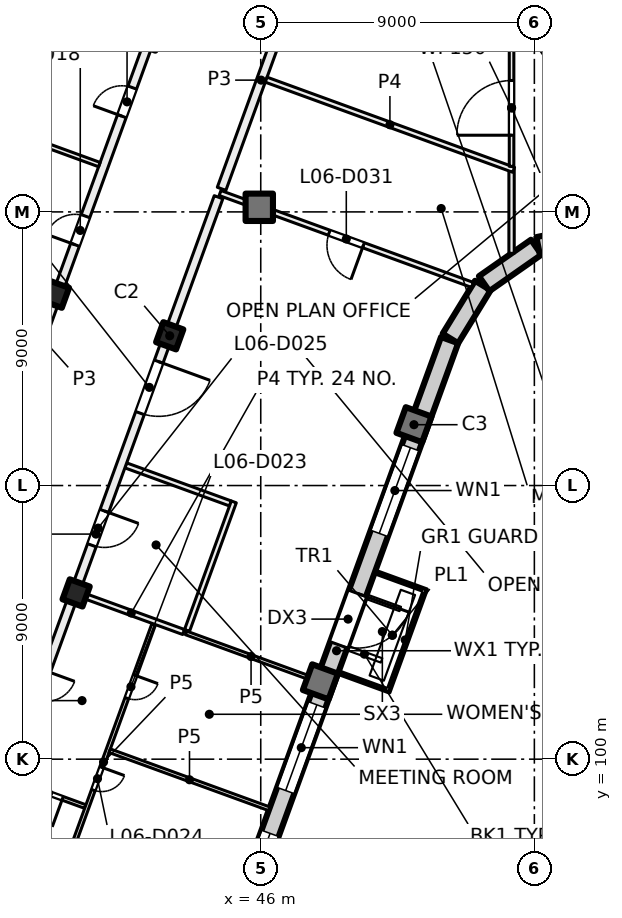
"""IFC4 building model, lengths in metres.
Left out: names, types, materials, properties, quantities, classifications, styles, units other than length and angle.
Written with IfcOpenShell. Run it as: python <this file> out.ifc"""

import sys

from ifc_helpers import new_model, si_unit, direction, frame, frame_2d, origin, origin_2d, place, context, subcontext, project, spatial, rectangle, hollow_rectangle, extrude, element, fill, save


model = new_model("IFC4")
c1 = context("Model", 3, precision=1e-05, world=origin(), true_north=direction((0.0, 1.0)))
c2 = subcontext(c1, "Body", "Model", "MODEL_VIEW")
j1 = project(units=[si_unit("LENGTHUNIT", "METRE"), si_unit("PLANEANGLEUNIT", "RADIAN")], contexts=[c1])
p1 = place(None, origin())
s1 = spatial("IfcSite", under=j1, at=p1, CompositionType="ELEMENT")
p2 = place(p1, origin())
s2 = spatial("IfcBuilding", under=s1, at=p2, CompositionType="ELEMENT")
p3 = place(p2, frame((0.0, 0.0, 31.5)))
s3 = spatial("IfcBuildingStorey", under=s2, at=p3, CompositionType="ELEMENT", Elevation=31.5)
p4 = place(p3, frame((56.036, 123.43, 0.0), z_axis=(0.0, 0.0, 1.0), x_axis=(0.573576436351, -0.819152044289, 0.0)))
e1 = element("IfcColumn", 1, at=p4, inside=s3, PredefinedType="COLUMN", context=c2, shape_type="SweptSolid", body=[
    extrude(hollow_rectangle(XDim=1.4, YDim=1.4, WallThickness=0.04, at=origin_2d()), origin(), (0.0, 0.0, 1.0), 4.0),
])
p5 = place(p3, frame((45.952, 118.152, 0.0), z_axis=(0.0, 0.0, 1.0), x_axis=(1.0, 0.0, 0.0)))
e2 = element("IfcColumn", 2, at=p5, inside=s3, PredefinedType="COLUMN", context=c2, shape_type="SweptSolid", body=[
    extrude(rectangle(XDim=0.9, YDim=0.9, at=origin_2d()), origin(), (0.0, 0.0, 1.0), 4.0),
])
for number, where, z_axis, x_axis in (
    (3, (43.006, 113.925, 0.0), (0.0, 0.0, 1.0), (-0.342, -0.94, 0.0)),
    (4, (39.927, 105.468, 0.0), (0.0, 0.0, 1.0), (-0.342, -0.94, 0.0)),
    (5, (39.247, 115.293, 0.0), (0.0, 0.0, 1.0), (-0.342, -0.94, 0.0)),
):
    element("IfcColumn", number, at=place(p3, frame(where, z_axis=z_axis, x_axis=x_axis)), inside=s3, PredefinedType="COLUMN", context=c2, shape_type="SweptSolid", body=[
        extrude(rectangle(XDim=0.7, YDim=0.7, at=origin_2d()), origin(), (0.0, 0.0, 1.0), 4.0),
    ])
for number, where, z_axis, x_axis in (
    (6, (51.04, 111.001, 0.0), (0.0, 0.0, 1.0), (-0.342, -0.94, 0.0)),
    (7, (47.962, 102.544, 0.0), (0.0, 0.0, 1.0), (-0.342, -0.94, 0.0)),
):
    element("IfcColumn", number, at=place(p3, frame(where, z_axis=z_axis, x_axis=x_axis)), inside=s3, PredefinedType="COLUMN", context=c2, shape_type="SweptSolid", body=[
        extrude(rectangle(XDim=0.9, YDim=0.9, at=origin_2d()), origin(), (0.0, 0.0, 1.0), 4.0),
    ])
p6 = place(p3, frame((52.212, 113.783, 0.0), z_axis=(0.0, 0.0, 1.0), x_axis=(-0.34202521188, -0.939690775968, 0.0)))
e8 = element("IfcWall", 8, at=p6, inside=s3, PredefinedType="SOLIDWALL", context=c2, shape_type="SweptSolid", body=[
    extrude(rectangle(XDim=21.745, YDim=0.6, at=frame_2d((10.873, 0.0))), origin(), (0.0, 0.0, 1.0), 3.625),
])
p7 = place(p6, frame((3.765, 0.0, 0.9)))
e9 = element("IfcOpeningElement", 9, at=p7, cuts=e8, PredefinedType="OPENING", context=c2, shape_type="SweptSolid", body=[
    extrude(rectangle(XDim=3.0, YDim=2.4, at=frame_2d((1.5, 1.2))), frame((0.0, 0.31, 0.0), z_axis=(0.0, -1.0, 0.0), x_axis=(1.0, 0.0, 0.0)), (0.0, 0.0, 1.0), 0.62),
])
p8 = place(p6, frame((8.865, 0.0, 0.0)))
e10 = element("IfcOpeningElement", 10, at=p8, cuts=e8, PredefinedType="OPENING", context=c2, shape_type="SweptSolid", body=[
    extrude(rectangle(XDim=1.8, YDim=2.4, at=frame_2d((0.9, 1.2))), frame((0.0, 0.31, 0.0), z_axis=(0.0, -1.0, 0.0), x_axis=(1.0, 0.0, 0.0)), (0.0, 0.0, 1.0), 0.62),
])
p9 = place(p6, frame((12.765, 0.0, 0.9)))
e11 = element("IfcOpeningElement", 11, at=p9, cuts=e8, PredefinedType="OPENING", context=c2, shape_type="SweptSolid", body=[
    extrude(rectangle(XDim=3.0, YDim=2.4, at=frame_2d((1.5, 1.2))), frame((0.0, 0.31, 0.0), z_axis=(0.0, -1.0, 0.0), x_axis=(1.0, 0.0, 0.0)), (0.0, 0.0, 1.0), 0.62),
])
p10 = place(p6, frame((17.265, 0.0, 0.9)))
e12 = element("IfcOpeningElement", 12, at=p10, cuts=e8, PredefinedType="OPENING", context=c2, shape_type="SweptSolid", body=[
    extrude(rectangle(XDim=3.0, YDim=2.4, at=frame_2d((1.5, 1.2))), frame((0.0, 0.31, 0.0), z_axis=(0.0, -1.0, 0.0), x_axis=(1.0, 0.0, 0.0)), (0.0, 0.0, 1.0), 0.62),
])
p11 = place(p3, frame((53.305, 115.578, 0.0), z_axis=(0.0, 0.0, 1.0), x_axis=(-0.522402266438, -0.852699168535, 0.0)))
e13 = element("IfcWall", 13, at=p11, inside=s3, PredefinedType="SOLIDWALL", context=c2, shape_type="SweptSolid", body=[
    extrude(rectangle(XDim=2.042, YDim=0.6, at=frame_2d((1.021, 0.0))), origin(), (0.0, 0.0, 1.0), 3.625),
])
for number, where, z_axis, x_axis in (
    (14, (55.062, 116.839, 0.0), (0.0, 0.0, 1.0), (-0.819, -0.574, 0.0)),
    (15, (57.175, 117.294, 0.0), (0.0, 0.0, 1.0), (-0.98, -0.199, 0.0)),
):
    element("IfcWall", number, at=place(p3, frame(where, z_axis=z_axis, x_axis=x_axis)), inside=s3, PredefinedType="SOLIDWALL", context=c2, shape_type="SweptSolid", body=[
        extrude(rectangle(XDim=2.092, YDim=0.6, at=frame_2d((1.046, 0.0))), origin(), (0.0, 0.0, 1.0), 3.625),
    ])
p12 = place(p3, frame((31.353, 118.166, 0.0), z_axis=(0.0, 0.0, 1.0), x_axis=(0.939687752599, -0.342033518263, 0.0)))
e16 = element("IfcWall", 16, at=p12, inside=s3, PredefinedType="PARTITIONING", context=c2, shape_type="SweptSolid", body=[
    extrude(rectangle(XDim=8.301, YDim=0.175, at=frame_2d((4.15, 0.0))), origin(), (0.0, 0.0, 1.0), 3.625),
])
p13 = place(p3, frame((32.881, 97.657, 0.0), z_axis=(0.0, 0.0, 1.0), x_axis=(0.342017360004, 0.939693633828, 0.0)))
e17 = element("IfcWall", 17, at=p13, inside=s3, PredefinedType="PARTITIONING", context=c2, shape_type="SweptSolid", body=[
    extrude(rectangle(XDim=34.516, YDim=0.3, at=frame_2d((17.258, 0.0))), origin(), (0.0, 0.0, 1.0), 3.625),
])
p14 = place(p13, frame((6.225, 0.0, 0.0)))
e18 = element("IfcOpeningElement", 18, at=p14, cuts=e17, PredefinedType="OPENING", context=c2, shape_type="SweptSolid", body=[
    extrude(rectangle(XDim=1.8, YDim=2.1, at=frame_2d((0.9, 1.05))), frame((0.0, 0.16, 0.0), z_axis=(0.0, -1.0, 0.0), x_axis=(1.0, 0.0, 0.0)), (0.0, 0.0, 1.0), 0.32),
])
p15 = place(p13, frame((15.9, 0.0, 0.0)))
e19 = element("IfcOpeningElement", 19, at=p15, cuts=e17, PredefinedType="OPENING", context=c2, shape_type="SweptSolid", body=[
    extrude(rectangle(XDim=1.2, YDim=2.1, at=frame_2d((0.6, 1.05))), frame((0.0, 0.16, 0.0), z_axis=(0.0, -1.0, 0.0), x_axis=(1.0, 0.0, 0.0)), (0.0, 0.0, 1.0), 0.32),
])
p16 = place(p13, frame((20.5, 0.0, 0.0)))
e20 = element("IfcOpeningElement", 20, at=p16, cuts=e17, PredefinedType="OPENING", context=c2, shape_type="SweptSolid", body=[
    extrude(rectangle(XDim=1.0, YDim=2.1, at=frame_2d((0.5, 1.05))), frame((0.0, 0.16, 0.0), z_axis=(0.0, -1.0, 0.0), x_axis=(1.0, 0.0, 0.0)), (0.0, 0.0, 1.0), 0.32),
])
p17 = place(p13, frame((25.0, 0.0, 0.0)))
e21 = element("IfcOpeningElement", 21, at=p17, cuts=e17, PredefinedType="OPENING", context=c2, shape_type="SweptSolid", body=[
    extrude(rectangle(XDim=1.0, YDim=2.1, at=frame_2d((0.5, 1.05))), frame((0.0, 0.16, 0.0), z_axis=(0.0, -1.0, 0.0), x_axis=(1.0, 0.0, 0.0)), (0.0, 0.0, 1.0), 0.32),
])
p18 = place(p13, frame((30.562, 0.0, 0.0)))
e22 = element("IfcOpeningElement", 22, at=p18, cuts=e17, PredefinedType="OPENING", context=c2, shape_type="SweptSolid", body=[
    extrude(rectangle(XDim=1.0, YDim=2.1, at=frame_2d((0.5, 1.05))), frame((0.0, 0.16, 0.0), z_axis=(0.0, -1.0, 0.0), x_axis=(1.0, 0.0, 0.0)), (0.0, 0.0, 1.0), 0.32),
])
p19 = place(p3, frame((32.892, 122.395, 0.0), z_axis=(0.0, 0.0, 1.0), x_axis=(0.939684311623, -0.3420429717, 0.0)))
e23 = element("IfcWall", 23, at=p19, inside=s3, PredefinedType="PARTITIONING", context=c2, shape_type="SweptSolid", body=[
    extrude(rectangle(XDim=8.301, YDim=0.15, at=frame_2d((4.15, 0.0))), origin(), (0.0, 0.0, 1.0), 3.625),
])
p20 = place(p3, frame((40.229, 98.441, 0.0), z_axis=(0.0, 0.0, 1.0), x_axis=(-0.939663852573, 0.342099173001, 0.0)))
e24 = element("IfcWall", 24, at=p20, inside=s3, PredefinedType="PARTITIONING", context=c2, shape_type="SweptSolid", body=[
    extrude(rectangle(XDim=2.587, YDim=0.125, at=frame_2d((1.293, 0.0))), origin(), (0.0, 0.0, 1.0), 3.625),
])
p21 = place(p20, frame((0.794, 0.0, 0.0)))
e25 = element("IfcOpeningElement", 25, at=p21, cuts=e24, PredefinedType="OPENING", context=c2, shape_type="SweptSolid", body=[
    extrude(rectangle(XDim=1.0, YDim=2.1, at=frame_2d((0.5, 1.05))), frame((0.0, 0.073, 0.0), z_axis=(0.0, -1.0, 0.0), x_axis=(1.0, 0.0, 0.0)), (0.0, 0.0, 1.0), 0.145),
])
p22 = place(p3, frame((42.482, 104.446, 0.0), z_axis=(0.0, 0.0, 1.0), x_axis=(-0.342025030348, -0.939690842041, 0.0)))
e26 = element("IfcWall", 26, at=p22, inside=s3, PredefinedType="PARTITIONING", context=c2, shape_type="SweptSolid", body=[
    extrude(rectangle(XDim=9.663, YDim=0.125, at=frame_2d((4.832, 0.0))), origin(), (0.0, 0.0, 1.0), 3.625),
])
p23 = place(p22, frame((1.797, 0.0, 0.0)))
e27 = element("IfcOpeningElement", 27, at=p23, cuts=e26, PredefinedType="OPENING", context=c2, shape_type="SweptSolid", body=[
    extrude(rectangle(XDim=0.8, YDim=2.1, at=frame_2d((0.4, 1.05))), frame((0.0, 0.073, 0.0), z_axis=(0.0, -1.0, 0.0), x_axis=(1.0, 0.0, 0.0)), (0.0, 0.0, 1.0), 0.145),
])
p24 = place(p22, frame((5.015, 0.0, 0.0)))
e28 = element("IfcOpeningElement", 28, at=p24, cuts=e26, PredefinedType="OPENING", context=c2, shape_type="SweptSolid", body=[
    extrude(rectangle(XDim=0.8, YDim=2.1, at=frame_2d((0.4, 1.05))), frame((0.0, 0.073, 0.0), z_axis=(0.0, -1.0, 0.0), x_axis=(1.0, 0.0, 0.0)), (0.0, 0.0, 1.0), 0.145),
])
p25 = place(p3, frame((40.021, 105.434, 0.0), z_axis=(0.0, 0.0, 1.0), x_axis=(0.939740864669, -0.341887565249, 0.0)))
e29 = element("IfcWall", 29, at=p25, inside=s3, PredefinedType="PARTITIONING", context=c2, shape_type="SweptSolid", body=[
    extrude(rectangle(XDim=3.663, YDim=0.175, at=frame_2d((1.831, 0.0))), origin(), (0.0, 0.0, 1.0), 3.625),
])
p26 = place(p3, frame((41.031, 100.278, 0.0), z_axis=(0.0, 0.0, 1.0), x_axis=(0.939696437289, -0.342009657388, 0.0)))
e30 = element("IfcWall", 30, at=p26, inside=s3, PredefinedType="PARTITIONING", context=c2, shape_type="SweptSolid", body=[
    extrude(rectangle(XDim=5.588, YDim=0.125, at=frame_2d((2.794, 0.0))), origin(), (0.0, 0.0, 1.0), 3.625),
])
p27 = place(p3, frame((41.561, 109.663, 0.0), z_axis=(0.0, 0.0, 1.0), x_axis=(0.939623960717, -0.342208726434, 0.0)))
e31 = element("IfcWall", 31, at=p27, inside=s3, PredefinedType="PARTITIONING", context=c2, shape_type="SweptSolid", body=[
    extrude(rectangle(XDim=3.662, YDim=0.175, at=frame_2d((1.831, 0.0))), origin(), (0.0, 0.0, 1.0), 3.625),
])
p28 = place(p3, frame((43.542, 104.153, 0.0), z_axis=(0.0, 0.0, 1.0), x_axis=(0.939646198652, -0.34214766017, 0.0)))
e32 = element("IfcWall", 32, at=p28, inside=s3, PredefinedType="PARTITIONING", context=c2, shape_type="SweptSolid", body=[
    extrude(rectangle(XDim=4.554, YDim=0.125, at=frame_2d((2.277, 0.0))), origin(), (0.0, 0.0, 1.0), 3.625),
])
p29 = place(p3, frame((52.965, 115.598, 0.0), z_axis=(0.0, 0.0, 1.0), x_axis=(-0.939650555598, 0.342135694374, 0.0)))
e33 = element("IfcWall", 33, at=p29, inside=s3, PredefinedType="PARTITIONING", context=c2, shape_type="SweptSolid", body=[
    extrude(rectangle(XDim=8.836, YDim=0.175, at=frame_2d((4.418, 0.0))), origin(), (0.0, 0.0, 1.0), 3.625),
])
p30 = place(p29, frame((3.818, 0.0, 0.0)))
e34 = element("IfcOpeningElement", 34, at=p30, cuts=e33, PredefinedType="OPENING", context=c2, shape_type="SweptSolid", body=[
    extrude(rectangle(XDim=1.2, YDim=2.1, at=frame_2d((0.6, 1.05))), frame((0.0, 0.097, 0.0), z_axis=(0.0, -1.0, 0.0), x_axis=(1.0, 0.0, 0.0)), (0.0, 0.0, 1.0), 0.195),
])
p31 = place(p3, frame((44.612, 118.483, 0.0), z_axis=(0.0, 0.0, 1.0), x_axis=(-0.342043123066, -0.939684256526, 0.0)))
e35 = element("IfcWall", 35, at=p31, inside=s3, PredefinedType="PARTITIONING", context=c2, shape_type="SweptSolid", body=[
    extrude(rectangle(XDim=23.582, YDim=0.3, at=frame_2d((11.791, 0.0))), origin(), (0.0, 0.0, 1.0), 3.625),
])
p32 = place(p31, frame((16.583, 0.0, 0.0)))
e36 = element("IfcOpeningElement", 36, at=p32, cuts=e35, PredefinedType="OPENING", context=c2, shape_type="SweptSolid", body=[
    extrude(rectangle(XDim=1.0, YDim=2.1, at=frame_2d((0.5, 1.05))), frame((0.0, 0.16, 0.0), z_axis=(0.0, -1.0, 0.0), x_axis=(1.0, 0.0, 0.0)), (0.0, 0.0, 1.0), 0.32),
])
p33 = place(p31, frame((10.982, 0.0, 0.0)))
e37 = element("IfcOpeningElement", 37, at=p33, cuts=e35, PredefinedType="OPENING", context=c2, shape_type="SweptSolid", body=[
    extrude(rectangle(XDim=1.2, YDim=2.1, at=frame_2d((0.6, 1.05))), frame((0.0, 0.16, 0.0), z_axis=(0.0, -1.0, 0.0), x_axis=(1.0, 0.0, 0.0)), (0.0, 0.0, 1.0), 0.32),
])
p34 = place(p31, frame((5.756, 0.0, 0.0)))
e38 = element("IfcOpeningElement", 38, at=p34, cuts=e35, PredefinedType="OPENING", context=c2, shape_type="SweptSolid", body=[
    extrude(rectangle(XDim=1.8, YDim=2.1, at=frame_2d((0.9, 1.05))), frame((0.0, 0.16, 0.0), z_axis=(0.0, -1.0, 0.0), x_axis=(1.0, 0.0, 0.0)), (0.0, 0.0, 1.0), 0.32),
])
p35 = place(p3, frame((45.114, 108.462, 0.0), z_axis=(0.0, 0.0, 1.0), x_axis=(-0.342056723843, -0.93967930576, 0.0)))
e39 = element("IfcWall", 39, at=p35, inside=s3, PredefinedType="PARTITIONING", context=c2, shape_type="SweptSolid", body=[
    extrude(rectangle(XDim=4.5, YDim=0.175, at=frame_2d((2.25, 0.0))), origin(), (0.0, 0.0, 1.0), 3.625),
])
p36 = place(p3, frame((47.314, 125.909, 0.0), z_axis=(0.0, 0.0, 1.0), x_axis=(-0.34198522802, -0.939705328183, 0.0)))
e40 = element("IfcWall", 40, at=p36, inside=s3, PredefinedType="PARTITIONING", context=c2, shape_type="SweptSolid", body=[
    extrude(rectangle(XDim=7.609, YDim=0.3, at=frame_2d((3.804, 0.0))), origin(), (0.0, 0.0, 1.0), 3.625),
])
p37 = place(p3, frame((54.25, 116.637, 0.0), z_axis=(0.0, 0.0, 1.0), x_axis=(0.0, 1.0, 0.0)))
e41 = element("IfcWall", 41, at=p37, inside=s3, PredefinedType="PARTITIONING", context=c2, shape_type="SweptSolid", body=[
    extrude(rectangle(XDim=2.776, YDim=0.175, at=frame_2d((1.388, 0.0))), origin(), (0.0, 0.0, 1.0), 3.625),
])
p38 = place(p3, frame((54.32, 119.384, 0.0), z_axis=(0.0, 0.0, 1.0), x_axis=(-0.939632908118, 0.342184157994, 0.0)))
e42 = element("IfcWall", 42, at=p38, inside=s3, PredefinedType="PARTITIONING", context=c2, shape_type="SweptSolid", body=[
    extrude(rectangle(XDim=8.665, YDim=0.175, at=frame_2d((4.333, 0.0))), origin(), (0.0, 0.0, 1.0), 3.625),
])
p39 = place(p3, frame((54.25, 119.498, 0.0), z_axis=(0.0, 0.0, 1.0), x_axis=(0.0, 1.0, 0.0)))
e43 = element("IfcWall", 43, at=p39, inside=s3, PredefinedType="PARTITIONING", context=c2, shape_type="SweptSolid", body=[
    extrude(rectangle(XDim=3.848, YDim=0.15, at=frame_2d((1.924, 0.0))), origin(), (0.0, 0.0, 1.0), 3.625),
])
p40 = place(p39, frame((1.024, 0.0, 0.0)))
e44 = element("IfcOpeningElement", 44, at=p40, cuts=e43, PredefinedType="OPENING", context=c2, shape_type="SweptSolid", body=[
    extrude(rectangle(XDim=1.8, YDim=2.1, at=frame_2d((0.9, 1.05))), frame((0.0, 0.085, 0.0), z_axis=(0.0, -1.0, 0.0), x_axis=(1.0, 0.0, 0.0)), (0.0, 0.0, 1.0), 0.17),
])
p41 = place(p7, origin())
e45 = element("IfcWindow", 45, at=p41, inside=s3, PartitioningType="SINGLE_PANEL", PredefinedType="WINDOW", context=c2, shape_type="SweptSolid", body=[
    extrude(rectangle(XDim=3.0, YDim=2.4, at=frame_2d((1.5, 1.2))), frame((0.0, 0.03, 0.0), z_axis=(0.0, -1.0, 0.0), x_axis=(1.0, 0.0, 0.0)), (0.0, 0.0, 1.0), 0.06),
])
fill(e9, e45)
p42 = place(p8, origin())
e46 = element("IfcDoor", 46, at=p42, inside=s3, OperationType="DOUBLE_DOOR_SINGLE_SWING", PredefinedType="DOOR", context=c2, shape_type="SweptSolid", body=[
    extrude(rectangle(XDim=1.8, YDim=2.4, at=frame_2d((0.9, 1.2))), frame((0.0, 0.025, 0.0), z_axis=(0.0, -1.0, 0.0), x_axis=(1.0, 0.0, 0.0)), (0.0, 0.0, 1.0), 0.05),
])
fill(e10, e46)
p43 = place(p9, origin())
e47 = element("IfcWindow", 47, at=p43, inside=s3, PartitioningType="SINGLE_PANEL", PredefinedType="WINDOW", context=c2, shape_type="SweptSolid", body=[
    extrude(rectangle(XDim=3.0, YDim=2.4, at=frame_2d((1.5, 1.2))), frame((0.0, 0.03, 0.0), z_axis=(0.0, -1.0, 0.0), x_axis=(1.0, 0.0, 0.0)), (0.0, 0.0, 1.0), 0.06),
])
fill(e11, e47)
p44 = place(p10, origin())
e48 = element("IfcWindow", 48, at=p44, inside=s3, PartitioningType="SINGLE_PANEL", PredefinedType="WINDOW", context=c2, shape_type="SweptSolid", body=[
    extrude(rectangle(XDim=3.0, YDim=2.4, at=frame_2d((1.5, 1.2))), frame((0.0, 0.03, 0.0), z_axis=(0.0, -1.0, 0.0), x_axis=(1.0, 0.0, 0.0)), (0.0, 0.0, 1.0), 0.06),
])
fill(e12, e48)
p45 = place(p40, origin())
e49 = element("IfcDoor", 49, at=p45, inside=s3, OperationType="DOUBLE_DOOR_SINGLE_SWING", PredefinedType="DOOR", context=c2, shape_type="SweptSolid", body=[
    extrude(rectangle(XDim=1.8, YDim=2.1, at=frame_2d((0.9, 1.05))), frame((0.0, 0.025, 0.0), z_axis=(0.0, -1.0, 0.0), x_axis=(1.0, 0.0, 0.0)), (0.0, 0.0, 1.0), 0.05),
])
fill(e44, e49)
p46 = place(p16, origin())
e50 = element("IfcDoor", 50, at=p46, inside=s3, OperationType="SINGLE_SWING_LEFT", PredefinedType="DOOR", context=c2, shape_type="SweptSolid", body=[
    extrude(rectangle(XDim=1.0, YDim=2.1, at=frame_2d((0.5, 1.05))), frame((0.0, 0.025, 0.0), z_axis=(0.0, -1.0, 0.0), x_axis=(1.0, 0.0, 0.0)), (0.0, 0.0, 1.0), 0.05),
])
fill(e20, e50)
p47 = place(p17, origin())
e51 = element("IfcDoor", 51, at=p47, inside=s3, OperationType="SINGLE_SWING_RIGHT", PredefinedType="DOOR", context=c2, shape_type="SweptSolid", body=[
    extrude(rectangle(XDim=1.0, YDim=2.1, at=frame_2d((0.5, 1.05))), frame((0.0, 0.025, 0.0), z_axis=(0.0, -1.0, 0.0), x_axis=(1.0, 0.0, 0.0)), (0.0, 0.0, 1.0), 0.05),
])
fill(e21, e51)
p48 = place(p21, origin())
e52 = element("IfcDoor", 52, at=p48, inside=s3, OperationType="SINGLE_SWING_RIGHT", PredefinedType="DOOR", context=c2, shape_type="SweptSolid", body=[
    extrude(rectangle(XDim=1.0, YDim=2.1, at=frame_2d((0.5, 1.05))), frame((0.0, 0.025, 0.0), z_axis=(0.0, -1.0, 0.0), x_axis=(1.0, 0.0, 0.0)), (0.0, 0.0, 1.0), 0.05),
])
fill(e25, e52)
p49 = place(p23, origin())
e53 = element("IfcDoor", 53, at=p49, inside=s3, OperationType="SINGLE_SWING_RIGHT", PredefinedType="DOOR", context=c2, shape_type="SweptSolid", body=[
    extrude(rectangle(XDim=0.8, YDim=2.1, at=frame_2d((0.4, 1.05))), frame((0.0, 0.025, 0.0), z_axis=(0.0, -1.0, 0.0), x_axis=(1.0, 0.0, 0.0)), (0.0, 0.0, 1.0), 0.05),
])
fill(e27, e53)
p50 = place(p24, origin())
e54 = element("IfcDoor", 54, at=p50, inside=s3, OperationType="SINGLE_SWING_LEFT", PredefinedType="DOOR", context=c2, shape_type="SweptSolid", body=[
    extrude(rectangle(XDim=0.8, YDim=2.1, at=frame_2d((0.4, 1.05))), frame((0.0, 0.025, 0.0), z_axis=(0.0, -1.0, 0.0), x_axis=(1.0, 0.0, 0.0)), (0.0, 0.0, 1.0), 0.05),
])
fill(e28, e54)
p51 = place(p33, origin())
e55 = element("IfcDoor", 55, at=p51, inside=s3, OperationType="DOUBLE_DOOR_SINGLE_SWING", PredefinedType="DOOR", context=c2, shape_type="SweptSolid", body=[
    extrude(rectangle(XDim=1.2, YDim=2.1, at=frame_2d((0.6, 1.05))), frame((0.0, 0.025, 0.0), z_axis=(0.0, -1.0, 0.0), x_axis=(1.0, 0.0, 0.0)), (0.0, 0.0, 1.0), 0.05),
])
fill(e37, e55)
p52 = place(p34, origin())
e56 = element("IfcDoor", 56, at=p52, inside=s3, OperationType="DOUBLE_DOOR_SINGLE_SWING", PredefinedType="DOOR", context=c2, shape_type="SweptSolid", body=[
    extrude(rectangle(XDim=1.8, YDim=2.1, at=frame_2d((0.9, 1.05))), frame((0.0, 0.025, 0.0), z_axis=(0.0, -1.0, 0.0), x_axis=(1.0, 0.0, 0.0)), (0.0, 0.0, 1.0), 0.05),
])
fill(e38, e56)
p53 = place(p30, origin())
e57 = element("IfcDoor", 57, at=p53, inside=s3, OperationType="DOUBLE_DOOR_SINGLE_SWING", PredefinedType="DOOR", context=c2, shape_type="SweptSolid", body=[
    extrude(rectangle(XDim=1.2, YDim=2.1, at=frame_2d((0.6, 1.05))), frame((0.0, 0.025, 0.0), z_axis=(0.0, -1.0, 0.0), x_axis=(1.0, 0.0, 0.0)), (0.0, 0.0, 1.0), 0.05),
])
fill(e34, e57)
save(model, sys.argv[1])
